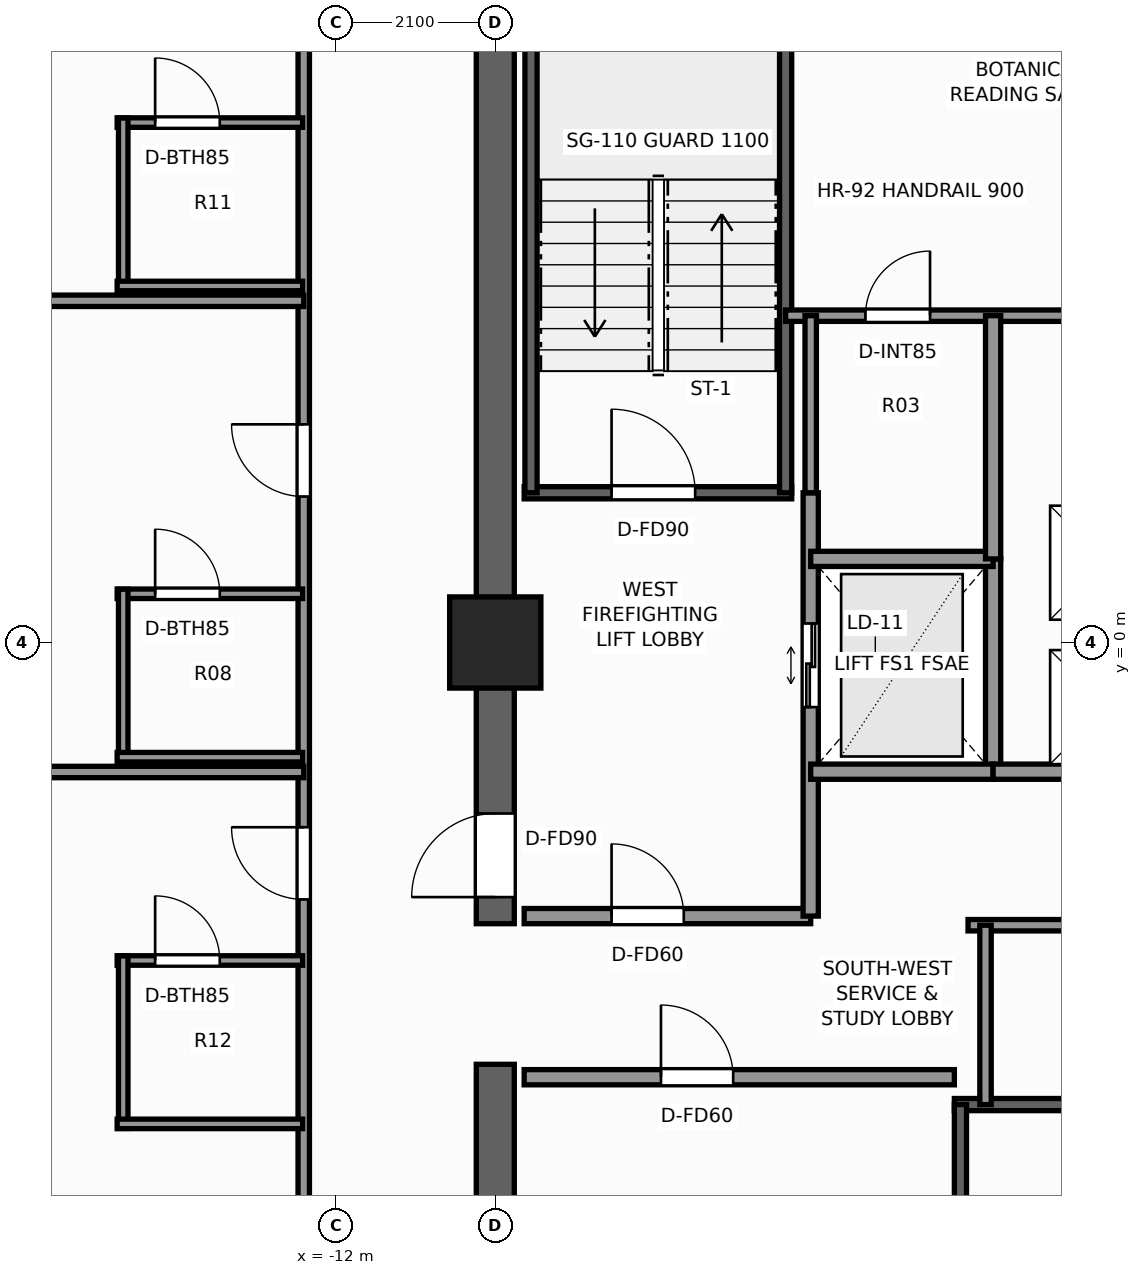
"""IFC4 building model, lengths in metres.
Left out: names, types, materials, properties, quantities, classifications, styles, units other than length and angle.
Written with IfcOpenShell. Run it as: python <this file> out.ifc"""

import sys

from ifc_helpers import new_model, si_unit, direction, frame, frame_2d, origin, origin_2d, place, context, subcontext, project, spatial, rectangle, extrude, element, fill, save


model = new_model("IFC4")
c1 = context("Model", 3, precision=1e-05, world=origin(), true_north=direction((0.0, 1.0)))
c2 = subcontext(c1, "Body", "Model", "MODEL_VIEW")
j1 = project(units=[si_unit("LENGTHUNIT", "METRE"), si_unit("PLANEANGLEUNIT", "RADIAN")], contexts=[c1])
p1 = place(None, origin())
s1 = spatial("IfcSite", under=j1, at=p1, CompositionType="ELEMENT")
p2 = place(p1, origin())
s2 = spatial("IfcBuilding", under=s1, at=p2, CompositionType="ELEMENT")
p3 = place(p2, frame((0.0, 0.0, 189.9)))
s3 = spatial("IfcBuildingStorey", under=s2, at=p3, CompositionType="ELEMENT", Elevation=189.9)
p4 = place(p3, frame((-9.9, -9.65, 0.0), z_axis=(0.0, 0.0, 1.0), x_axis=(0.0, 1.0, 0.0)))
e1 = element("IfcWall", 1, at=p4, inside=s3, PredefinedType="SHEAR", context=c2, shape_type="SweptSolid", body=[
    extrude(rectangle(XDim=4.1, YDim=0.5, at=frame_2d((2.05, 0.0))), origin(), (0.0, 0.0, 1.0), 3.3),
])
p5 = place(p3, frame((-9.9, -3.7, 0.0), z_axis=(0.0, 0.0, 1.0), x_axis=(0.0, 1.0, 0.0)))
e2 = element("IfcWall", 2, at=p5, inside=s3, PredefinedType="SHEAR", context=c2, shape_type="SweptSolid", body=[
    extrude(rectangle(XDim=13.35, YDim=0.5, at=frame_2d((6.675, 0.0))), origin(), (0.0, 0.0, 1.0), 3.3),
])
p6 = place(p5, frame((0.35, 0.0, 0.0)))
e3 = element("IfcOpeningElement", 3, at=p6, cuts=e2, PredefinedType="OPENING", context=c2, shape_type="SweptSolid", body=[
    extrude(rectangle(XDim=1.1, YDim=2.2, at=frame_2d((0.55, 1.1))), frame((0.0, 0.26, 0.0), z_axis=(0.0, -1.0, 0.0), x_axis=(1.0, 0.0, 0.0)), (0.0, 0.0, 1.0), 0.52),
])
p7 = place(p3, frame((-9.9, 0.0, 0.0), z_axis=(0.0, 0.0, 1.0), x_axis=(1.0, 0.0, 0.0)))
e4 = element("IfcColumn", 4, at=p7, inside=s3, PredefinedType="COLUMN", context=c2, shape_type="SweptSolid", body=[
    extrude(rectangle(XDim=1.2, YDim=1.2, at=origin_2d()), origin(), (0.0, 0.0, 1.0), 3.3),
])
p8 = place(p3, frame((-9.52, 1.97, 0.0), z_axis=(0.0, 0.0, 1.0), x_axis=(1.0, 0.0, 0.0)))
e5 = element("IfcWall", 5, at=p8, inside=s3, PredefinedType="SHEAR", context=c2, shape_type="SweptSolid", body=[
    extrude(rectangle(XDim=3.52, YDim=0.16, at=frame_2d((1.76, 0.0))), origin(), (0.0, 0.0, 1.0), 3.3),
])
p9 = place(p8, frame((1.15, 0.0, 0.0)))
e6 = element("IfcOpeningElement", 6, at=p9, cuts=e5, PredefinedType="OPENING", context=c2, shape_type="SweptSolid", body=[
    extrude(rectangle(XDim=1.1, YDim=2.2, at=frame_2d((0.55, 1.1))), frame((0.0, 0.09, 0.0), z_axis=(0.0, -1.0, 0.0), x_axis=(1.0, 0.0, 0.0)), (0.0, 0.0, 1.0), 0.18),
])
for number, where, z_axis, x_axis in (
    (7, (-9.43, 1.97, 0.0), (0.0, 0.0, 1.0), (0.0, 1.0, 0.0)),
    (8, (-6.08, 1.97, 0.0), (0.0, 0.0, 1.0), (0.0, 1.0, 0.0)),
):
    element("IfcWall", number, at=place(p3, frame(where, z_axis=z_axis, x_axis=x_axis)), inside=s3, PredefinedType="SHEAR", context=c2, shape_type="SweptSolid", body=[
        extrude(rectangle(XDim=7.56, YDim=0.16, at=frame_2d((3.78, 0.0))), origin(), (0.0, 0.0, 1.0), 3.3),
    ])
p10 = place(p3, frame((-3.86, -6.08, 0.0), z_axis=(0.0, 0.0, 1.0), x_axis=(1.0, 0.0, 0.0)))
e9 = element("IfcWall", 9, at=p10, inside=s3, PredefinedType="SHEAR", context=c2, shape_type="SweptSolid", body=[
    extrude(rectangle(XDim=7.72, YDim=0.16, at=frame_2d((3.86, 0.0))), origin(), (0.0, 0.0, 1.0), 3.3),
])
p11 = place(p3, frame((-3.78, -9.43, 0.0), z_axis=(0.0, 0.0, 1.0), x_axis=(0.0, 1.0, 0.0)))
e10 = element("IfcWall", 10, at=p11, inside=s3, PredefinedType="SHEAR", context=c2, shape_type="SweptSolid", body=[
    extrude(rectangle(XDim=3.35, YDim=0.16, at=frame_2d((1.675, 0.0))), origin(), (0.0, 0.0, 1.0), 3.3),
])
p12 = place(p3, frame((-9.52, -3.6, 0.0), z_axis=(0.0, 0.0, 1.0), x_axis=(1.0, 0.0, 0.0)))
e11 = element("IfcWall", 11, at=p12, inside=s3, PredefinedType="SOLIDWALL", context=c2, shape_type="SweptSolid", body=[
    extrude(rectangle(XDim=3.77, YDim=0.2, at=frame_2d((1.885, 0.0))), origin(), (0.0, 0.0, 1.0), 3.08),
])
p13 = place(p12, frame((1.15, 0.0, 0.0)))
e12 = element("IfcOpeningElement", 12, at=p13, cuts=e11, PredefinedType="OPENING", context=c2, shape_type="SweptSolid", body=[
    extrude(rectangle(XDim=0.95, YDim=2.06, at=frame_2d((0.475, 1.03))), frame((0.0, 0.11, 0.0), z_axis=(0.0, -1.0, 0.0), x_axis=(1.0, 0.0, 0.0)), (0.0, 0.0, 1.0), 0.22),
])
p14 = place(p3, frame((-5.75, -3.6, 0.0), z_axis=(0.0, 0.0, 1.0), x_axis=(0.0, 1.0, 0.0)))
e13 = element("IfcWall", 13, at=p14, inside=s3, PredefinedType="SOLIDWALL", context=c2, shape_type="SweptSolid", body=[
    extrude(rectangle(XDim=5.57, YDim=0.2, at=frame_2d((2.785, 0.0))), origin(), (0.0, 0.0, 1.0), 2.715),
])
p15 = place(p14, frame((2.75, 0.0, 0.0)))
e14 = element("IfcOpeningElement", 14, at=p15, cuts=e13, PredefinedType="OPENING", context=c2, shape_type="SweptSolid", body=[
    extrude(rectangle(XDim=1.1, YDim=2.2, at=frame_2d((0.55, 1.1))), frame((0.0, 0.11, 0.0), z_axis=(0.0, -1.0, 0.0), x_axis=(1.0, 0.0, 0.0)), (0.0, 0.0, 1.0), 0.22),
])
p16 = place(p3, frame((-3.35, -1.7, 0.0), z_axis=(0.0, 0.0, 1.0), x_axis=(0.0, 1.0, 0.0)))
e15 = element("IfcWall", 15, at=p16, inside=s3, PredefinedType="SOLIDWALL", context=c2, shape_type="SweptSolid", body=[
    extrude(rectangle(XDim=2.8, YDim=0.2, at=frame_2d((1.4, 0.0))), origin(), (0.0, 0.0, 1.0), 2.715),
])
for number, where, z_axis, x_axis in (
    (16, (-5.75, -1.7, 0.0), (0.0, 0.0, 1.0), (1.0, 0.0, 0.0)),
    (17, (-5.75, 1.1, 0.0), (0.0, 0.0, 1.0), (1.0, 0.0, 0.0)),
):
    element("IfcWall", number, at=place(p3, frame(where, z_axis=z_axis, x_axis=x_axis)), inside=s3, PredefinedType="SOLIDWALL", context=c2, shape_type="SweptSolid", body=[
        extrude(rectangle(XDim=2.4, YDim=0.2, at=frame_2d((1.2, 0.0))), origin(), (0.0, 0.0, 1.0), 3.08),
    ])
p17 = place(p3, frame((-6.08, 4.3, 0.0), z_axis=(0.0, 0.0, 1.0), x_axis=(1.0, 0.0, 0.0)))
e18 = element("IfcWall", 18, at=p17, inside=s3, PredefinedType="PARTITIONING", context=c2, shape_type="SweptSolid", body=[
    extrude(rectangle(XDim=6.3, YDim=0.15, at=frame_2d((3.15, 0.0))), origin(), (0.0, 0.0, 1.0), 3.08),
])
p18 = place(p17, frame((1.05, 0.0, 0.0)))
e19 = element("IfcOpeningElement", 19, at=p18, cuts=e18, PredefinedType="OPENING", context=c2, shape_type="SweptSolid", body=[
    extrude(rectangle(XDim=0.85, YDim=2.03, at=frame_2d((0.425, 1.015))), frame((0.0, 0.085, 0.0), z_axis=(0.0, -1.0, 0.0), x_axis=(1.0, 0.0, 0.0)), (0.0, 0.0, 1.0), 0.17),
])
p19 = place(p3, frame((-9.52, -5.72, 0.0), z_axis=(0.0, 0.0, 1.0), x_axis=(1.0, 0.0, 0.0)))
e20 = element("IfcWall", 20, at=p19, inside=s3, PredefinedType="SOLIDWALL", context=c2, shape_type="SweptSolid", body=[
    extrude(rectangle(XDim=5.66, YDim=0.2, at=frame_2d((2.83, 0.0))), origin(), (0.0, 0.0, 1.0), 3.08),
])
p20 = place(p19, frame((1.8, 0.0, 0.0)))
e21 = element("IfcOpeningElement", 21, at=p20, cuts=e20, PredefinedType="OPENING", context=c2, shape_type="SweptSolid", body=[
    extrude(rectangle(XDim=0.95, YDim=2.06, at=frame_2d((0.475, 1.03))), frame((0.0, 0.11, 0.0), z_axis=(0.0, -1.0, 0.0), x_axis=(1.0, 0.0, 0.0)), (0.0, 0.0, 1.0), 0.22),
])
p21 = place(p3, frame((-3.35, -1.7, 0.0), z_axis=(0.0, 0.0, 1.0), x_axis=(1.0, 0.0, 0.0)))
e22 = element("IfcWall", 22, at=p21, inside=s3, PredefinedType="SOLIDWALL", context=c2, shape_type="SweptSolid", body=[
    extrude(rectangle(XDim=6.7, YDim=0.2, at=frame_2d((3.35, 0.0))), origin(), (0.0, 0.0, 1.0), 2.715),
])
p22 = place(p3, frame((-3.35, 1.1, 0.0), z_axis=(0.0, 0.0, 1.0), x_axis=(0.0, 1.0, 0.0)))
e23 = element("IfcWall", 23, at=p22, inside=s3, PredefinedType="SOLIDWALL", context=c2, shape_type="SweptSolid", body=[
    extrude(rectangle(XDim=3.2, YDim=0.2, at=frame_2d((1.6, 0.0))), origin(), (0.0, 0.0, 1.0), 2.715),
])
p23 = place(p3, frame((-3.68, -3.72, 0.0), z_axis=(0.0, 0.0, 1.0), x_axis=(1.0, 0.0, 0.0)))
e24 = element("IfcWall", 24, at=p23, inside=s3, PredefinedType="PARTITIONING", context=c2, shape_type="SweptSolid", body=[
    extrude(rectangle(XDim=7.36, YDim=0.15, at=frame_2d((3.68, 0.0))), origin(), (0.0, 0.0, 1.0), 3.08),
])
p24 = place(p3, frame((-3.45, -6.08, 0.0), z_axis=(0.0, 0.0, 1.0), x_axis=(0.0, 1.0, 0.0)))
e25 = element("IfcWall", 25, at=p24, inside=s3, PredefinedType="PARTITIONING", context=c2, shape_type="SweptSolid", body=[
    extrude(rectangle(XDim=2.36, YDim=0.15, at=frame_2d((1.18, 0.0))), origin(), (0.0, 0.0, 1.0), 3.08),
])
p25 = place(p3, frame((-5.75, 1.97, 0.0), z_axis=(0.0, 0.0, 1.0), x_axis=(0.0, 1.0, 0.0)))
e26 = element("IfcWall", 26, at=p25, inside=s3, PredefinedType="PARTITIONING", context=c2, shape_type="SweptSolid", body=[
    extrude(rectangle(XDim=2.33, YDim=0.15, at=frame_2d((1.165, 0.0))), origin(), (0.0, 0.0, 1.0), 2.715),
])
p26 = place(p3, frame((-12.42, -12.42, 0.0), z_axis=(0.0, 0.0, 1.0), x_axis=(0.0, 1.0, 0.0)))
e27 = element("IfcWall", 27, at=p26, inside=s3, PredefinedType="PARTITIONING", context=c2, shape_type="SweptSolid", body=[
    extrude(rectangle(XDim=24.84, YDim=0.15, at=frame_2d((12.42, 0.0))), origin(), (0.0, 0.0, 1.0), 2.369),
])
p27 = place(p26, frame((3.323, 0.0, 0.0)))
e28 = element("IfcOpeningElement", 28, at=p27, cuts=e27, PredefinedType="OPENING", context=c2, shape_type="SweptSolid", body=[
    extrude(rectangle(XDim=0.95, YDim=2.06, at=frame_2d((0.475, 1.03))), frame((0.0, 0.085, 0.0), z_axis=(0.0, -1.0, 0.0), x_axis=(1.0, 0.0, 0.0)), (0.0, 0.0, 1.0), 0.17),
])
p28 = place(p26, frame((9.039, 0.0, 0.0)))
e29 = element("IfcOpeningElement", 29, at=p28, cuts=e27, PredefinedType="OPENING", context=c2, shape_type="SweptSolid", body=[
    extrude(rectangle(XDim=0.95, YDim=2.06, at=frame_2d((0.475, 1.03))), frame((0.0, 0.085, 0.0), z_axis=(0.0, -1.0, 0.0), x_axis=(1.0, 0.0, 0.0)), (0.0, 0.0, 1.0), 0.17),
])
p29 = place(p26, frame((14.341, 0.0, 0.0)))
e30 = element("IfcOpeningElement", 30, at=p29, cuts=e27, PredefinedType="OPENING", context=c2, shape_type="SweptSolid", body=[
    extrude(rectangle(XDim=0.95, YDim=2.06, at=frame_2d((0.475, 1.03))), frame((0.0, 0.085, 0.0), z_axis=(0.0, -1.0, 0.0), x_axis=(1.0, 0.0, 0.0)), (0.0, 0.0, 1.0), 0.17),
])
p30 = place(p26, frame((20.375, 0.0, 0.0)))
e31 = element("IfcOpeningElement", 31, at=p30, cuts=e27, PredefinedType="OPENING", context=c2, shape_type="SweptSolid", body=[
    extrude(rectangle(XDim=0.95, YDim=2.06, at=frame_2d((0.475, 1.03))), frame((0.0, 0.085, 0.0), z_axis=(0.0, -1.0, 0.0), x_axis=(1.0, 0.0, 0.0)), (0.0, 0.0, 1.0), 0.17),
])
p31 = place(p3, frame((-20.38, -1.704, 0.0), z_axis=(0.0, 0.0, 1.0), x_axis=(1.0, 0.0, 0.0)))
e32 = element("IfcWall", 32, at=p31, inside=s3, PredefinedType="PARTITIONING", context=c2, shape_type="SweptSolid", body=[
    extrude(rectangle(XDim=7.96, YDim=0.15, at=frame_2d((3.98, 0.0))), origin(), (0.0, 0.0, 1.0), 2.453),
])
p32 = place(p3, frame((-14.875, -4.184, 0.0), z_axis=(0.0, 0.0, 1.0), x_axis=(1.0, 0.0, 0.0)))
e33 = element("IfcWall", 33, at=p32, inside=s3, PredefinedType="PARTITIONING", context=c2, shape_type="SweptSolid", body=[
    extrude(rectangle(XDim=2.44, YDim=0.125, at=frame_2d((1.22, 0.0))), origin(), (0.0, 0.0, 1.0), 3.08),
])
p33 = place(p32, frame((0.5, 0.0, 0.0)))
e34 = element("IfcOpeningElement", 34, at=p33, cuts=e33, PredefinedType="OPENING", context=c2, shape_type="SweptSolid", body=[
    extrude(rectangle(XDim=0.85, YDim=2.03, at=frame_2d((0.425, 1.015))), frame((0.0, 0.073, 0.0), z_axis=(0.0, -1.0, 0.0), x_axis=(1.0, 0.0, 0.0)), (0.0, 0.0, 1.0), 0.145),
])
p34 = place(p3, frame((-14.795, -6.394, 0.0), z_axis=(0.0, 0.0, 1.0), x_axis=(0.0, 1.0, 0.0)))
e35 = element("IfcWall", 35, at=p34, inside=s3, PredefinedType="PARTITIONING", context=c2, shape_type="SweptSolid", body=[
    extrude(rectangle(XDim=2.27, YDim=0.125, at=frame_2d((1.135, 0.0))), origin(), (0.0, 0.0, 1.0), 2.369),
])
p35 = place(p3, frame((-14.875, -6.334, 0.0), z_axis=(0.0, 0.0, 1.0), x_axis=(1.0, 0.0, 0.0)))
e36 = element("IfcWall", 36, at=p35, inside=s3, PredefinedType="PARTITIONING", context=c2, shape_type="SweptSolid", body=[
    extrude(rectangle(XDim=2.44, YDim=0.125, at=frame_2d((1.22, 0.0))), origin(), (0.0, 0.0, 1.0), 3.08),
])
p36 = place(p3, frame((-20.38, 4.496, 0.0), z_axis=(0.0, 0.0, 1.0), x_axis=(1.0, 0.0, 0.0)))
e37 = element("IfcWall", 37, at=p36, inside=s3, PredefinedType="PARTITIONING", context=c2, shape_type="SweptSolid", body=[
    extrude(rectangle(XDim=7.96, YDim=0.15, at=frame_2d((3.98, 0.0))), origin(), (0.0, 0.0, 1.0), 2.369),
])
p37 = place(p3, frame((-14.875, 0.641, 0.0), z_axis=(0.0, 0.0, 1.0), x_axis=(1.0, 0.0, 0.0)))
e38 = element("IfcWall", 38, at=p37, inside=s3, PredefinedType="PARTITIONING", context=c2, shape_type="SweptSolid", body=[
    extrude(rectangle(XDim=2.44, YDim=0.125, at=frame_2d((1.22, 0.0))), origin(), (0.0, 0.0, 1.0), 3.08),
])
p38 = place(p37, frame((0.5, 0.0, 0.0)))
e39 = element("IfcOpeningElement", 39, at=p38, cuts=e38, PredefinedType="OPENING", context=c2, shape_type="SweptSolid", body=[
    extrude(rectangle(XDim=0.85, YDim=2.03, at=frame_2d((0.425, 1.015))), frame((0.0, 0.073, 0.0), z_axis=(0.0, -1.0, 0.0), x_axis=(1.0, 0.0, 0.0)), (0.0, 0.0, 1.0), 0.145),
])
p39 = place(p3, frame((-14.795, -1.569, 0.0), z_axis=(0.0, 0.0, 1.0), x_axis=(0.0, 1.0, 0.0)))
e40 = element("IfcWall", 40, at=p39, inside=s3, PredefinedType="PARTITIONING", context=c2, shape_type="SweptSolid", body=[
    extrude(rectangle(XDim=2.27, YDim=0.125, at=frame_2d((1.135, 0.0))), origin(), (0.0, 0.0, 1.0), 2.605),
])
p40 = place(p3, frame((-14.875, -1.509, 0.0), z_axis=(0.0, 0.0, 1.0), x_axis=(1.0, 0.0, 0.0)))
e41 = element("IfcWall", 41, at=p40, inside=s3, PredefinedType="PARTITIONING", context=c2, shape_type="SweptSolid", body=[
    extrude(rectangle(XDim=2.44, YDim=0.125, at=frame_2d((1.22, 0.0))), origin(), (0.0, 0.0, 1.0), 3.08),
])
p41 = place(p3, frame((-14.875, 6.841, 0.0), z_axis=(0.0, 0.0, 1.0), x_axis=(1.0, 0.0, 0.0)))
e42 = element("IfcWall", 42, at=p41, inside=s3, PredefinedType="PARTITIONING", context=c2, shape_type="SweptSolid", body=[
    extrude(rectangle(XDim=2.44, YDim=0.125, at=frame_2d((1.22, 0.0))), origin(), (0.0, 0.0, 1.0), 3.08),
])
p42 = place(p41, frame((0.5, 0.0, 0.0)))
e43 = element("IfcOpeningElement", 43, at=p42, cuts=e42, PredefinedType="OPENING", context=c2, shape_type="SweptSolid", body=[
    extrude(rectangle(XDim=0.85, YDim=2.03, at=frame_2d((0.425, 1.015))), frame((0.0, 0.073, 0.0), z_axis=(0.0, -1.0, 0.0), x_axis=(1.0, 0.0, 0.0)), (0.0, 0.0, 1.0), 0.145),
])
p43 = place(p3, frame((-14.795, 4.631, 0.0), z_axis=(0.0, 0.0, 1.0), x_axis=(0.0, 1.0, 0.0)))
e44 = element("IfcWall", 44, at=p43, inside=s3, PredefinedType="PARTITIONING", context=c2, shape_type="SweptSolid", body=[
    extrude(rectangle(XDim=2.27, YDim=0.125, at=frame_2d((1.135, 0.0))), origin(), (0.0, 0.0, 1.0), 2.369),
])
p44 = place(p3, frame((-14.875, 4.691, 0.0), z_axis=(0.0, 0.0, 1.0), x_axis=(1.0, 0.0, 0.0)))
e45 = element("IfcWall", 45, at=p44, inside=s3, PredefinedType="PARTITIONING", context=c2, shape_type="SweptSolid", body=[
    extrude(rectangle(XDim=2.44, YDim=0.125, at=frame_2d((1.22, 0.0))), origin(), (0.0, 0.0, 1.0), 2.369),
])
p45 = place(p3, frame((0.0, 0.0, -0.22)))
p46 = place(p45, frame((-1.85, -0.85, 0.0)))
p47 = place(p46, frame((0.0, 0.0, 0.17)))
e46 = element("IfcWindow", 46, at=p47, inside=s3, PartitioningType="SINGLE_PANEL", PredefinedType="SKYLIGHT", context=c2, shape_type="SweptSolid", body=[
    extrude(rectangle(XDim=1.5, YDim=1.5, at=origin_2d()), origin(), (0.0, 0.0, 1.0), 0.05),
])
p48 = place(p45, frame((-1.85, 1.05, 0.0)))
p49 = place(p48, frame((0.0, 0.0, 0.17)))
e47 = element("IfcWindow", 47, at=p49, inside=s3, PartitioningType="SINGLE_PANEL", PredefinedType="SKYLIGHT", context=c2, shape_type="SweptSolid", body=[
    extrude(rectangle(XDim=1.5, YDim=1.5, at=origin_2d()), origin(), (0.0, 0.0, 1.0), 0.05),
])
p50 = place(p9, origin())
e48 = element("IfcDoor", 48, at=p50, inside=s3, OperationType="SINGLE_SWING_LEFT", PredefinedType="DOOR", context=c2, shape_type="SweptSolid", body=[
    extrude(rectangle(XDim=1.1, YDim=2.2, at=frame_2d((0.55, 1.1))), frame((0.0, 0.025, 0.0), z_axis=(0.0, -1.0, 0.0), x_axis=(1.0, 0.0, 0.0)), (0.0, 0.0, 1.0), 0.05),
])
fill(e6, e48)
p51 = place(p6, origin())
e49 = element("IfcDoor", 49, at=p51, inside=s3, OperationType="SINGLE_SWING_LEFT", PredefinedType="DOOR", context=c2, shape_type="SweptSolid", body=[
    extrude(rectangle(XDim=1.1, YDim=2.2, at=frame_2d((0.55, 1.1))), frame((0.0, 0.025, 0.0), z_axis=(0.0, -1.0, 0.0), x_axis=(1.0, 0.0, 0.0)), (0.0, 0.0, 1.0), 0.05),
])
fill(e3, e49)
p52 = place(p15, origin())
e50 = element("IfcDoor", 50, at=p52, inside=s3, OperationType="DOUBLE_DOOR_SLIDING", PredefinedType="DOOR", context=c2, shape_type="SweptSolid", body=[
    extrude(rectangle(XDim=1.1, YDim=2.2, at=frame_2d((0.55, 1.1))), frame((0.0, 0.025, 0.0), z_axis=(0.0, -1.0, 0.0), x_axis=(1.0, 0.0, 0.0)), (0.0, 0.0, 1.0), 0.05),
])
fill(e14, e50)
p53 = place(p20, origin())
e51 = element("IfcDoor", 51, at=p53, inside=s3, OperationType="SINGLE_SWING_LEFT", PredefinedType="DOOR", context=c2, shape_type="SweptSolid", body=[
    extrude(rectangle(XDim=0.95, YDim=2.06, at=frame_2d((0.475, 1.03))), frame((0.0, 0.025, 0.0), z_axis=(0.0, -1.0, 0.0), x_axis=(1.0, 0.0, 0.0)), (0.0, 0.0, 1.0), 0.05),
])
fill(e21, e51)
p54 = place(p13, origin())
e52 = element("IfcDoor", 52, at=p54, inside=s3, OperationType="SINGLE_SWING_LEFT", PredefinedType="DOOR", context=c2, shape_type="SweptSolid", body=[
    extrude(rectangle(XDim=0.95, YDim=2.06, at=frame_2d((0.475, 1.03))), frame((0.0, 0.025, 0.0), z_axis=(0.0, -1.0, 0.0), x_axis=(1.0, 0.0, 0.0)), (0.0, 0.0, 1.0), 0.05),
])
fill(e12, e52)
p55 = place(p18, origin())
e53 = element("IfcDoor", 53, at=p55, inside=s3, OperationType="SINGLE_SWING_RIGHT", PredefinedType="DOOR", context=c2, shape_type="SweptSolid", body=[
    extrude(rectangle(XDim=0.85, YDim=2.03, at=frame_2d((0.425, 1.015))), frame((0.0, 0.025, 0.0), z_axis=(0.0, -1.0, 0.0), x_axis=(1.0, 0.0, 0.0)), (0.0, 0.0, 1.0), 0.05),
])
fill(e19, e53)
p56 = place(p33, origin())
e54 = element("IfcDoor", 54, at=p56, inside=s3, OperationType="SINGLE_SWING_LEFT", PredefinedType="DOOR", context=c2, shape_type="SweptSolid", body=[
    extrude(rectangle(XDim=0.85, YDim=2.03, at=frame_2d((0.425, 1.015))), frame((0.0, 0.025, 0.0), z_axis=(0.0, -1.0, 0.0), x_axis=(1.0, 0.0, 0.0)), (0.0, 0.0, 1.0), 0.05),
])
fill(e34, e54)
p57 = place(p28, origin())
e55 = element("IfcDoor", 55, at=p57, inside=s3, OperationType="SINGLE_SWING_RIGHT", PredefinedType="DOOR", context=c2, shape_type="SweptSolid", body=[
    extrude(rectangle(XDim=0.95, YDim=2.06, at=frame_2d((0.475, 1.03))), frame((0.0, 0.025, 0.0), z_axis=(0.0, -1.0, 0.0), x_axis=(1.0, 0.0, 0.0)), (0.0, 0.0, 1.0), 0.05),
])
fill(e29, e55)
p58 = place(p38, origin())
e56 = element("IfcDoor", 56, at=p58, inside=s3, OperationType="SINGLE_SWING_LEFT", PredefinedType="DOOR", context=c2, shape_type="SweptSolid", body=[
    extrude(rectangle(XDim=0.85, YDim=2.03, at=frame_2d((0.425, 1.015))), frame((0.0, 0.025, 0.0), z_axis=(0.0, -1.0, 0.0), x_axis=(1.0, 0.0, 0.0)), (0.0, 0.0, 1.0), 0.05),
])
fill(e39, e56)
p59 = place(p29, origin())
e57 = element("IfcDoor", 57, at=p59, inside=s3, OperationType="SINGLE_SWING_RIGHT", PredefinedType="DOOR", context=c2, shape_type="SweptSolid", body=[
    extrude(rectangle(XDim=0.95, YDim=2.06, at=frame_2d((0.475, 1.03))), frame((0.0, 0.025, 0.0), z_axis=(0.0, -1.0, 0.0), x_axis=(1.0, 0.0, 0.0)), (0.0, 0.0, 1.0), 0.05),
])
fill(e30, e57)
p60 = place(p42, origin())
e58 = element("IfcDoor", 58, at=p60, inside=s3, OperationType="SINGLE_SWING_LEFT", PredefinedType="DOOR", context=c2, shape_type="SweptSolid", body=[
    extrude(rectangle(XDim=0.85, YDim=2.03, at=frame_2d((0.425, 1.015))), frame((0.0, 0.025, 0.0), z_axis=(0.0, -1.0, 0.0), x_axis=(1.0, 0.0, 0.0)), (0.0, 0.0, 1.0), 0.05),
])
fill(e43, e58)
save(model, sys.argv[1])
